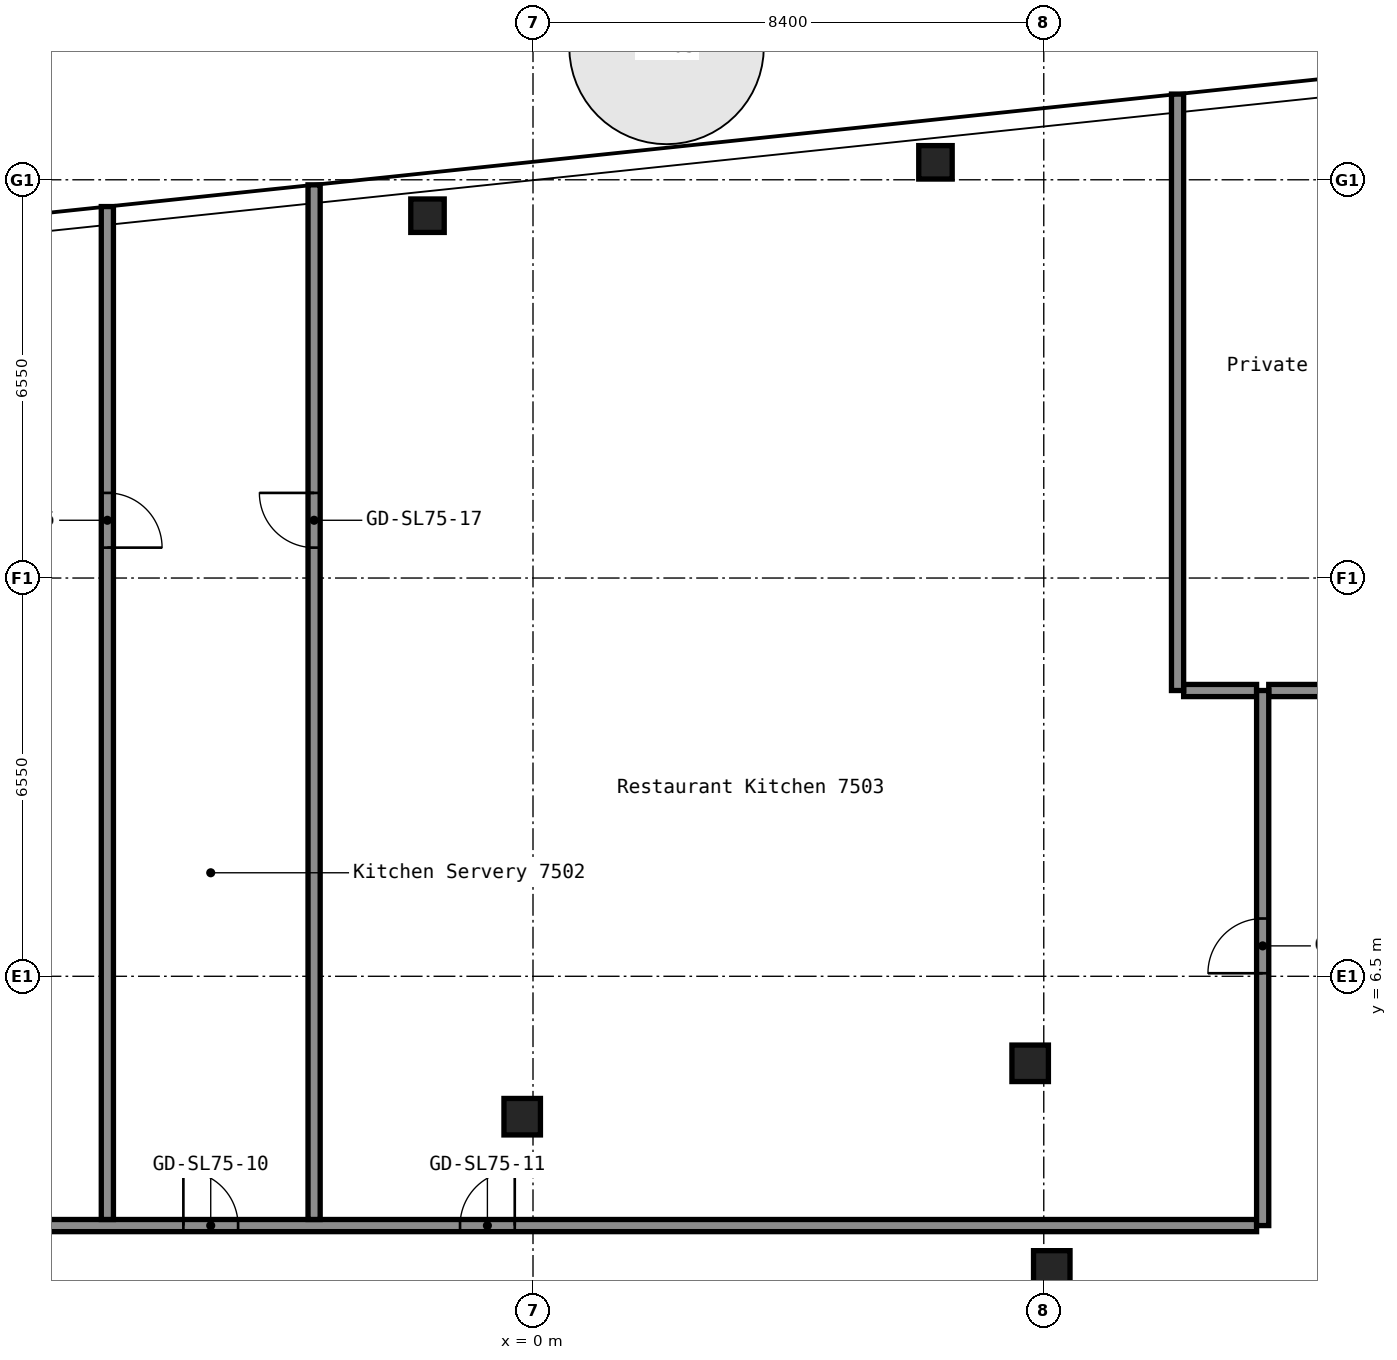
"""IFC4 building model, lengths in metres.
Left out: names, types, materials, properties, quantities, classifications, styles, units other than length and angle.
Written with IfcOpenShell. Run it as: python <this file> out.ifc"""

import sys

from ifc_helpers import new_model, si_unit, direction, frame, frame_2d, origin, origin_2d, place, context, subcontext, project, spatial, rectangle, hollow_rectangle, extrude, element, fill, save


model = new_model("IFC4")
c1 = context("Model", 3, precision=1e-05, world=origin(), true_north=direction((0.0, 1.0)))
c2 = subcontext(c1, "Body", "Model", "MODEL_VIEW")
j1 = project(units=[si_unit("LENGTHUNIT", "METRE"), si_unit("PLANEANGLEUNIT", "RADIAN")], contexts=[c1])
p1 = place(None, origin())
s1 = spatial("IfcSite", under=j1, at=p1, CompositionType="ELEMENT")
p2 = place(p1, origin())
s2 = spatial("IfcBuilding", under=s1, at=p2, CompositionType="ELEMENT")
p3 = place(p2, frame((0.0, 0.0, 264.6)))
s3 = spatial("IfcBuildingStorey", under=s2, at=p3, CompositionType="ELEMENT", Elevation=264.6)
p4 = place(p3, frame((-0.178, 4.191, 0.0), z_axis=(0.0, 0.0, 1.0), x_axis=(1.0, 0.0, 0.0)))
e1 = element("IfcColumn", 1, at=p4, inside=s3, PredefinedType="COLUMN", context=c2, shape_type="SweptSolid", body=[
    extrude(hollow_rectangle(XDim=0.6, YDim=0.6, WallThickness=0.025, InnerFilletRadius=0.038, OuterFilletRadius=0.062, at=origin_2d()), origin(), (0.0, 0.0, 1.0), 5.55),
])
p5 = place(p3, frame((-1.735, 19.009, 0.0), z_axis=(0.0, 0.0, 1.0), x_axis=(1.0, 0.0, 0.0)))
e2 = element("IfcColumn", 2, at=p5, inside=s3, PredefinedType="COLUMN", context=c2, shape_type="SweptSolid", body=[
    extrude(hollow_rectangle(XDim=0.55, YDim=0.55, WallThickness=0.022, InnerFilletRadius=0.033, OuterFilletRadius=0.055, at=origin_2d()), origin(), (0.0, 0.0, 1.0), 5.55),
])
for number, where, z_axis, x_axis in (
    (3, (8.532, 1.688, 0.0), (0.0, 0.0, 1.0), (1.0, 0.0, 0.0)),
    (4, (8.176, 5.069, 0.0), (0.0, 0.0, 1.0), (1.0, 0.0, 0.0)),
):
    element("IfcColumn", number, at=place(p3, frame(where, z_axis=z_axis, x_axis=x_axis)), inside=s3, PredefinedType="COLUMN", context=c2, shape_type="SweptSolid", body=[
        extrude(hollow_rectangle(XDim=0.6, YDim=0.6, WallThickness=0.025, InnerFilletRadius=0.038, OuterFilletRadius=0.062, at=origin_2d()), origin(), (0.0, 0.0, 1.0), 5.55),
    ])
p6 = place(p3, frame((6.619, 19.887, 0.0), z_axis=(0.0, 0.0, 1.0), x_axis=(1.0, 0.0, 0.0)))
e5 = element("IfcColumn", 5, at=p6, inside=s3, PredefinedType="COLUMN", context=c2, shape_type="SweptSolid", body=[
    extrude(hollow_rectangle(XDim=0.55, YDim=0.55, WallThickness=0.022, InnerFilletRadius=0.033, OuterFilletRadius=0.055, at=origin_2d()), origin(), (0.0, 0.0, 1.0), 5.55),
])
p7 = place(p3, frame((-13.1, 2.4, 0.0), z_axis=(0.0, 0.0, 1.0), x_axis=(1.0, 0.0, 0.0)))
e6 = element("IfcWall", 6, at=p7, inside=s3, PredefinedType="PARTITIONING", context=c2, shape_type="SweptSolid", body=[
    extrude(rectangle(XDim=25.0, YDim=0.2, at=frame_2d((12.5, 0.0))), origin(), (0.0, 0.0, 1.0), 5.55),
])
p8 = place(p7, frame((0.2, 0.0, 0.0)))
e7 = element("IfcOpeningElement", 7, at=p8, cuts=e6, PredefinedType="OPENING", context=c2, shape_type="SweptSolid", body=[
    extrude(rectangle(XDim=1.6, YDim=2.1, at=frame_2d((0.8, 1.05))), frame((0.0, 0.11, 0.0), z_axis=(0.0, -1.0, 0.0), x_axis=(1.0, 0.0, 0.0)), (0.0, 0.0, 1.0), 0.22),
])
p9 = place(p7, frame((7.35, 0.0, 0.0)))
e8 = element("IfcOpeningElement", 8, at=p9, cuts=e6, PredefinedType="OPENING", context=c2, shape_type="SweptSolid", body=[
    extrude(rectangle(XDim=0.9, YDim=2.1, at=frame_2d((0.45, 1.05))), frame((0.0, 0.11, 0.0), z_axis=(0.0, -1.0, 0.0), x_axis=(1.0, 0.0, 0.0)), (0.0, 0.0, 1.0), 0.22),
])
p10 = place(p7, frame((11.9, 0.0, 0.0)))
e9 = element("IfcOpeningElement", 9, at=p10, cuts=e6, PredefinedType="OPENING", context=c2, shape_type="SweptSolid", body=[
    extrude(rectangle(XDim=0.9, YDim=2.1, at=frame_2d((0.45, 1.05))), frame((0.0, 0.11, 0.0), z_axis=(0.0, -1.0, 0.0), x_axis=(1.0, 0.0, 0.0)), (0.0, 0.0, 1.0), 0.22),
])
p11 = place(p3, frame((10.7, 11.2, 0.0), z_axis=(0.0, 0.0, 1.0), x_axis=(1.0, 0.0, 0.0)))
e10 = element("IfcWall", 10, at=p11, inside=s3, PredefinedType="PARTITIONING", context=c2, shape_type="SweptSolid", body=[
    extrude(rectangle(XDim=1.2, YDim=0.2, at=frame_2d((0.6, 0.0))), origin(), (0.0, 0.0, 1.0), 5.55),
])
p12 = place(p3, frame((12.1, 11.2, 0.0), z_axis=(0.0, 0.0, 1.0), x_axis=(1.0, 0.0, 0.0)))
e11 = element("IfcWall", 11, at=p12, inside=s3, PredefinedType="PARTITIONING", context=c2, shape_type="SweptSolid", body=[
    extrude(rectangle(XDim=25.295, YDim=0.2, at=frame_2d((12.648, 0.0))), origin(), (0.0, 0.0, 1.0), 5.55),
])
p13 = place(p12, frame((1.8, 0.0, 0.0)))
e12 = element("IfcOpeningElement", 12, at=p13, cuts=e11, PredefinedType="OPENING", context=c2, shape_type="SweptSolid", body=[
    extrude(rectangle(XDim=1.0, YDim=2.1, at=frame_2d((0.5, 1.05))), frame((0.0, 0.11, 0.0), z_axis=(0.0, -1.0, 0.0), x_axis=(1.0, 0.0, 0.0)), (0.0, 0.0, 1.0), 0.22),
])
p14 = place(p12, frame((9.6, 0.0, 0.0)))
e13 = element("IfcOpeningElement", 13, at=p14, cuts=e11, PredefinedType="OPENING", context=c2, shape_type="SweptSolid", body=[
    extrude(rectangle(XDim=1.6, YDim=2.1, at=frame_2d((0.8, 1.05))), frame((0.0, 0.11, 0.0), z_axis=(0.0, -1.0, 0.0), x_axis=(1.0, 0.0, 0.0)), (0.0, 0.0, 1.0), 0.22),
])
p15 = place(p12, frame((20.8, 0.0, 0.0)))
e14 = element("IfcOpeningElement", 14, at=p15, cuts=e11, PredefinedType="OPENING", context=c2, shape_type="SweptSolid", body=[
    extrude(rectangle(XDim=1.0, YDim=2.1, at=frame_2d((0.5, 1.05))), frame((0.0, 0.11, 0.0), z_axis=(0.0, -1.0, 0.0), x_axis=(1.0, 0.0, 0.0)), (0.0, 0.0, 1.0), 0.22),
])
p16 = place(p3, frame((-7.0, 2.5, 0.0), z_axis=(0.0, 0.0, 1.0), x_axis=(0.0, 1.0, 0.0)))
e15 = element("IfcWall", 15, at=p16, inside=s3, PredefinedType="PARTITIONING", context=c2, shape_type="SweptSolid", body=[
    extrude(rectangle(XDim=16.66, YDim=0.2, at=frame_2d((8.33, 0.0))), origin(), (0.0, 0.0, 1.0), 5.55),
])
p17 = place(p16, frame((11.05, 0.0, 0.0)))
e16 = element("IfcOpeningElement", 16, at=p17, cuts=e15, PredefinedType="OPENING", context=c2, shape_type="SweptSolid", body=[
    extrude(rectangle(XDim=0.9, YDim=2.1, at=frame_2d((0.45, 1.05))), frame((0.0, 0.11, 0.0), z_axis=(0.0, -1.0, 0.0), x_axis=(1.0, 0.0, 0.0)), (0.0, 0.0, 1.0), 0.22),
])
p18 = place(p3, frame((-3.6, 2.5, 0.0), z_axis=(0.0, 0.0, 1.0), x_axis=(0.0, 1.0, 0.0)))
e17 = element("IfcWall", 17, at=p18, inside=s3, PredefinedType="PARTITIONING", context=c2, shape_type="SweptSolid", body=[
    extrude(rectangle(XDim=17.017, YDim=0.2, at=frame_2d((8.508, 0.0))), origin(), (0.0, 0.0, 1.0), 5.55),
])
p19 = place(p18, frame((11.05, 0.0, 0.0)))
e18 = element("IfcOpeningElement", 18, at=p19, cuts=e17, PredefinedType="OPENING", context=c2, shape_type="SweptSolid", body=[
    extrude(rectangle(XDim=0.9, YDim=2.1, at=frame_2d((0.45, 1.05))), frame((0.0, 0.11, 0.0), z_axis=(0.0, -1.0, 0.0), x_axis=(1.0, 0.0, 0.0)), (0.0, 0.0, 1.0), 0.22),
])
p20 = place(p3, frame((10.6, 11.2, 0.0), z_axis=(0.0, 0.0, 1.0), x_axis=(0.0, 1.0, 0.0)))
e19 = element("IfcWall", 19, at=p20, inside=s3, PredefinedType="PARTITIONING", context=c2, shape_type="SweptSolid", body=[
    extrude(rectangle(XDim=9.81, YDim=0.2, at=frame_2d((4.905, 0.0))), origin(), (0.0, 0.0, 1.0), 5.55),
])
p21 = place(p3, frame((12.0, 2.4, 0.0), z_axis=(0.0, 0.0, 1.0), x_axis=(0.0, 1.0, 0.0)))
e20 = element("IfcWall", 20, at=p21, inside=s3, PredefinedType="PARTITIONING", context=c2, shape_type="SweptSolid", body=[
    extrude(rectangle(XDim=8.8, YDim=0.2, at=frame_2d((4.4, 0.0))), origin(), (0.0, 0.0, 1.0), 5.55),
])
p22 = place(p21, frame((4.15, 0.0, 0.0)))
e21 = element("IfcOpeningElement", 21, at=p22, cuts=e20, PredefinedType="OPENING", context=c2, shape_type="SweptSolid", body=[
    extrude(rectangle(XDim=0.9, YDim=2.1, at=frame_2d((0.45, 1.05))), frame((0.0, 0.11, 0.0), z_axis=(0.0, -1.0, 0.0), x_axis=(1.0, 0.0, 0.0)), (0.0, 0.0, 1.0), 0.22),
])
p23 = place(p9, origin())
e22 = element("IfcDoor", 22, at=p23, inside=s3, OperationType="SINGLE_SWING_RIGHT", PredefinedType="DOOR", context=c2, shape_type="SweptSolid", body=[
    extrude(rectangle(XDim=0.9, YDim=2.1, at=frame_2d((0.45, 1.05))), frame((0.0, 0.025, 0.0), z_axis=(0.0, -1.0, 0.0), x_axis=(1.0, 0.0, 0.0)), (0.0, 0.0, 1.0), 0.05),
])
fill(e8, e22)
p24 = place(p10, origin())
e23 = element("IfcDoor", 23, at=p24, inside=s3, OperationType="SINGLE_SWING_LEFT", PredefinedType="DOOR", context=c2, shape_type="SweptSolid", body=[
    extrude(rectangle(XDim=0.9, YDim=2.1, at=frame_2d((0.45, 1.05))), frame((0.0, 0.025, 0.0), z_axis=(0.0, -1.0, 0.0), x_axis=(1.0, 0.0, 0.0)), (0.0, 0.0, 1.0), 0.05),
])
fill(e9, e23)
p25 = place(p17, origin())
e24 = element("IfcDoor", 24, at=p25, inside=s3, OperationType="SINGLE_SWING_LEFT", PredefinedType="DOOR", context=c2, shape_type="SweptSolid", body=[
    extrude(rectangle(XDim=0.9, YDim=2.1, at=frame_2d((0.45, 1.05))), frame((0.0, 0.025, 0.0), z_axis=(0.0, -1.0, 0.0), x_axis=(1.0, 0.0, 0.0)), (0.0, 0.0, 1.0), 0.05),
])
fill(e16, e24)
p26 = place(p19, origin())
e25 = element("IfcDoor", 25, at=p26, inside=s3, OperationType="SINGLE_SWING_LEFT", PredefinedType="DOOR", context=c2, shape_type="SweptSolid", body=[
    extrude(rectangle(XDim=0.9, YDim=2.1, at=frame_2d((0.45, 1.05))), frame((0.0, 0.025, 0.0), z_axis=(0.0, -1.0, 0.0), x_axis=(1.0, 0.0, 0.0)), (0.0, 0.0, 1.0), 0.05),
])
fill(e18, e25)
p27 = place(p22, origin())
e26 = element("IfcDoor", 26, at=p27, inside=s3, OperationType="SINGLE_SWING_RIGHT", PredefinedType="DOOR", context=c2, shape_type="SweptSolid", body=[
    extrude(rectangle(XDim=0.9, YDim=2.1, at=frame_2d((0.45, 1.05))), frame((0.0, 0.025, 0.0), z_axis=(0.0, -1.0, 0.0), x_axis=(1.0, 0.0, 0.0)), (0.0, 0.0, 1.0), 0.05),
])
fill(e21, e26)
save(model, sys.argv[1])
